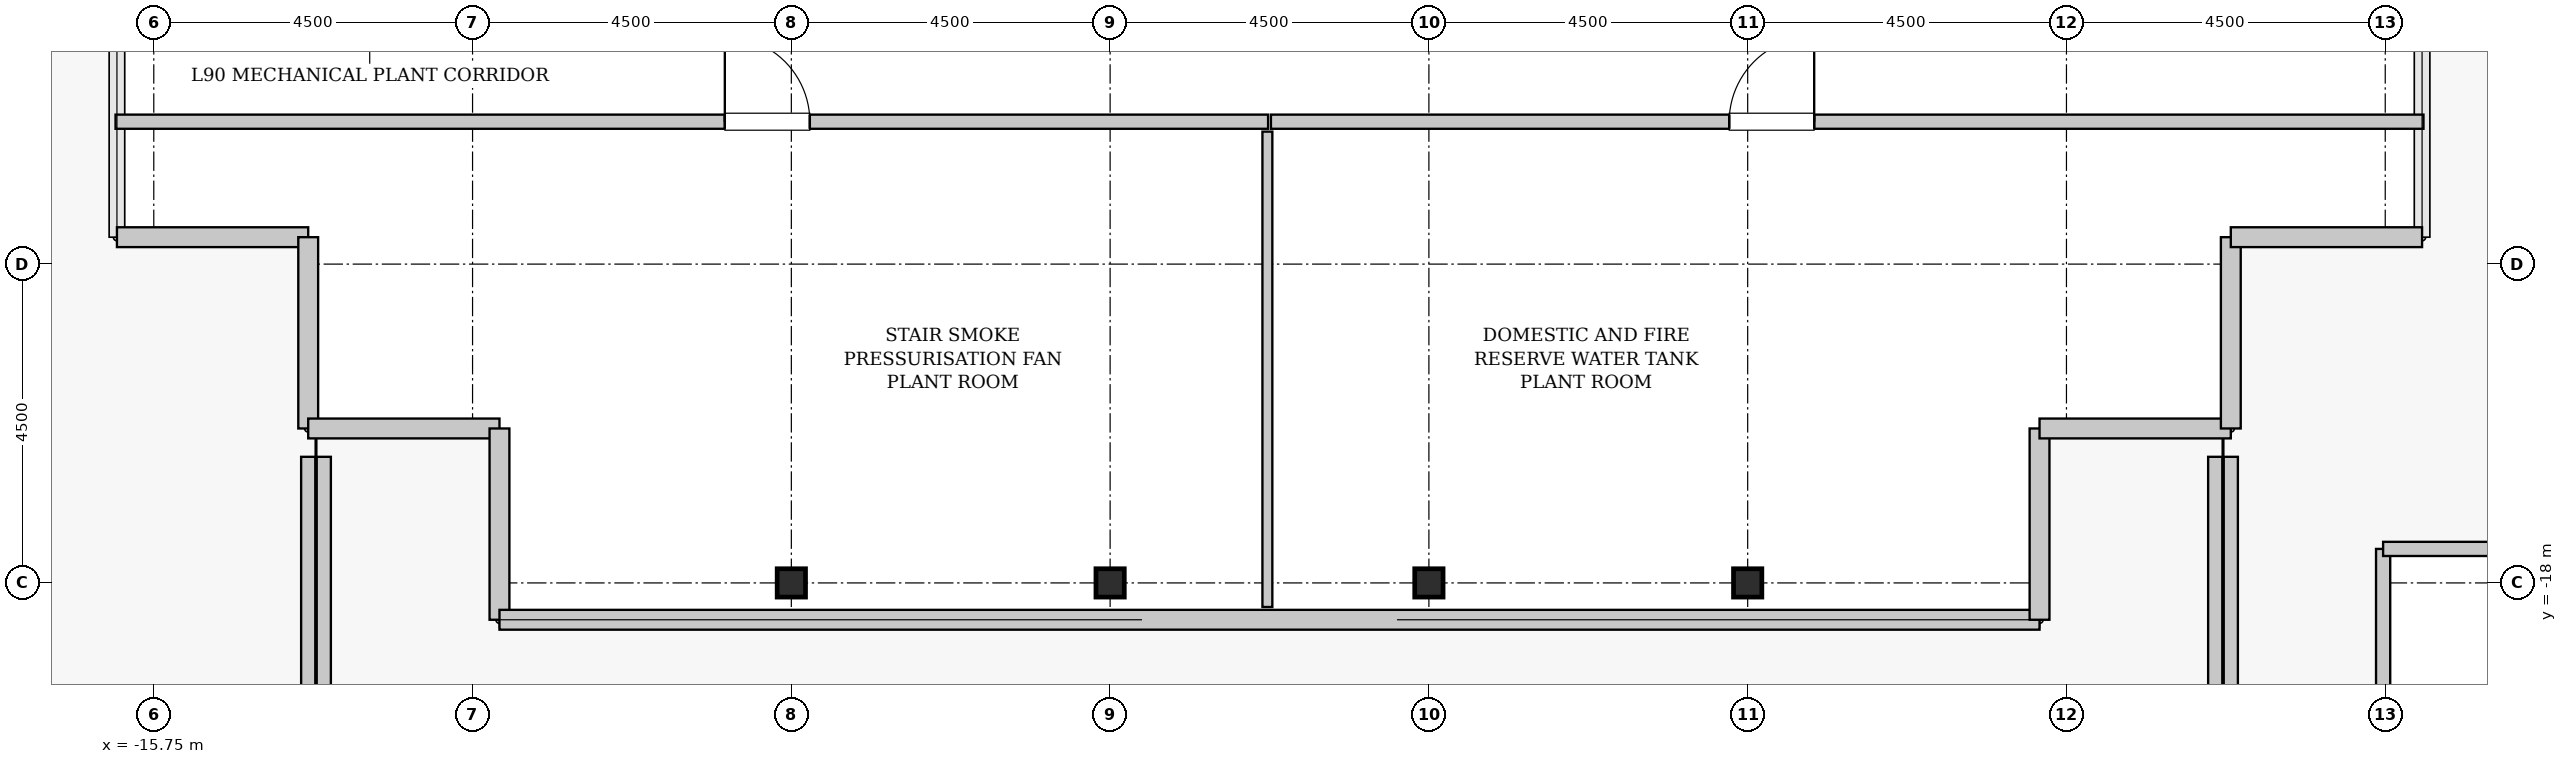
"""IFC4 building model, lengths in metres.
Left out: names, types, materials, properties, quantities, classifications, styles, units other than length and angle.
Written with IfcOpenShell. Run it as: python <this file> out.ifc"""

import sys

from ifc_helpers import new_model, si_unit, direction, frame, frame_2d, origin, origin_2d, place, context, subcontext, project, spatial, rectangle, hollow_rectangle, extrude, source, transform, mapped, element, fill, save


model = new_model("IFC4")
c1 = context("Model", 3, precision=1e-05, world=origin(), true_north=direction((0.0, 1.0)))
c2 = subcontext(c1, "Body", "Model", "MODEL_VIEW")
j1 = project(units=[si_unit("LENGTHUNIT", "METRE"), si_unit("PLANEANGLEUNIT", "RADIAN")], contexts=[c1])
p1 = place(None, origin())
s1 = spatial("IfcSite", under=j1, at=p1, CompositionType="ELEMENT")
p2 = place(p1, origin())
s2 = spatial("IfcBuilding", under=s1, at=p2, CompositionType="ELEMENT")
p3 = place(p2, frame((0.0, 0.0, 358.6)))
s3 = spatial("IfcBuildingStorey", under=s2, at=p3, CompositionType="ELEMENT", Elevation=358.6)
m1 = source(origin(), c2, "Body", "SweptSolid", [
    extrude(hollow_rectangle(XDim=0.4, YDim=0.4, WallThickness=0.02, InnerFilletRadius=0.02, OuterFilletRadius=0.04, at=origin_2d()), origin(), (0.0, 0.0, 1.0), 4.4),
])
for number, where, z_axis, x_axis in (
    (1, (-6.75, -18.0, 0.0), (0.0, 0.0, 1.0), (1.0, 0.0, 0.0)),
    (2, (-2.25, -18.0, 0.0), (0.0, 0.0, 1.0), (1.0, 0.0, 0.0)),
    (3, (2.25, -18.0, 0.0), (0.0, 0.0, 1.0), (1.0, 0.0, 0.0)),
    (4, (6.75, -18.0, 0.0), (0.0, 0.0, 1.0), (1.0, 0.0, 0.0)),
):
    element("IfcColumn", number, at=place(p3, frame(where, z_axis=z_axis, x_axis=x_axis)), inside=s3, PredefinedType="COLUMN", context=c2, shape_type="MappedRepresentation", body=[
        mapped(m1, transform((0.0, 0.0, 0.0), x_axis=(1.0, 0.0, 0.0), y_axis=(0.0, 1.0, 0.0), z_axis=(0.0, 0.0, 1.0), scale=1.0)),
    ])
m2 = source(origin(), c2, "Body", "SweptSolid", [
    extrude(rectangle(XDim=6.7, YDim=0.2, at=frame_2d((3.35, 0.0))), origin(), (0.0, 0.0, 1.0), 1.15),
])
p4 = place(p3, frame((-13.57, -16.22, 0.0), z_axis=(0.0, 0.0, 1.0), x_axis=(0.0, -1.0, 0.0)))
e5 = element("IfcWall", 5, at=p4, inside=s3, PredefinedType="PARAPET", context=c2, shape_type="MappedRepresentation", body=[
    mapped(m2, transform((0.0, 0.0, 0.0), x_axis=(1.0, 0.0, 0.0), y_axis=(0.0, 1.0, 0.0), z_axis=(0.0, 0.0, 1.0), scale=1.0)),
])
m3 = source(origin(), c2, "Body", "SweptSolid", [
    extrude(rectangle(XDim=2.7, YDim=0.2, at=frame_2d((1.35, 0.0))), origin(), (0.0, 0.0, 1.0), 1.15),
])
p5 = place(p3, frame((15.72, -17.52, 0.0), z_axis=(0.0, 0.0, 1.0), x_axis=(0.0, -1.0, 0.0)))
e6 = element("IfcWall", 6, at=p5, inside=s3, PredefinedType="PARAPET", context=c2, shape_type="MappedRepresentation", body=[
    mapped(m3, transform((0.0, 0.0, 0.0), x_axis=(1.0, 0.0, 0.0), y_axis=(0.0, 1.0, 0.0), z_axis=(0.0, 0.0, 1.0), scale=1.0)),
])
m4 = source(origin(), c2, "Body", "SweptSolid", [
    extrude(rectangle(XDim=4.0, YDim=0.2, at=frame_2d((2.0, 0.0))), origin(), (0.0, 0.0, 1.0), 1.15),
])
p6 = place(p3, frame((13.57, -20.22, 0.0), z_axis=(0.0, 0.0, 1.0), x_axis=(0.0, 1.0, 0.0)))
e7 = element("IfcWall", 7, at=p6, inside=s3, PredefinedType="PARAPET", context=c2, shape_type="MappedRepresentation", body=[
    mapped(m4, transform((0.0, 0.0, 0.0), x_axis=(1.0, 0.0, 0.0), y_axis=(0.0, 1.0, 0.0), z_axis=(0.0, 0.0, 1.0), scale=1.0)),
])
p7 = place(p3, frame((18.42, -17.52, 0.0), z_axis=(0.0, 0.0, 1.0), x_axis=(-1.0, 0.0, 0.0)))
e8 = element("IfcWall", 8, at=p7, inside=s3, PredefinedType="PARAPET", context=c2, shape_type="MappedRepresentation", body=[
    mapped(m3, transform((0.0, 0.0, 0.0), x_axis=(1.0, 0.0, 0.0), y_axis=(0.0, 1.0, 0.0), z_axis=(0.0, 0.0, 1.0), scale=1.0)),
])
p8 = place(p3, frame((-13.35, -22.92, 0.0), z_axis=(0.0, 0.0, 1.0), x_axis=(0.0, 1.0, 0.0)))
e9 = element("IfcWall", 9, at=p8, inside=s3, PredefinedType="PARAPET", context=c2, shape_type="MappedRepresentation", body=[
    mapped(m2, transform((0.0, 0.0, 0.0), x_axis=(1.0, 0.0, 0.0), y_axis=(0.0, 1.0, 0.0), z_axis=(0.0, 0.0, 1.0), scale=1.0)),
])
p9 = place(p3, frame((13.35, -16.22, 0.0), z_axis=(0.0, 0.0, 1.0), x_axis=(0.0, -1.0, 0.0)))
e10 = element("IfcWall", 10, at=p9, inside=s3, PredefinedType="PARAPET", context=c2, shape_type="MappedRepresentation", body=[
    mapped(m4, transform((0.0, 0.0, 0.0), x_axis=(1.0, 0.0, 0.0), y_axis=(0.0, 1.0, 0.0), z_axis=(0.0, 0.0, 1.0), scale=1.0)),
])
m5 = source(origin(), c2, "Body", "SweptSolid", [
    extrude(rectangle(XDim=2.7, YDim=0.28, at=frame_2d((1.35, 0.0))), origin(), (0.0, 0.0, 1.0), 4.1),
])
for number, where, z_axis, x_axis in (
    (11, (-16.27, -13.12, 0.0), (0.0, 0.0, 1.0), (1.0, 0.0, 0.0)),
    (12, (-13.57, -13.12, 0.0), (0.0, 0.0, 1.0), (0.0, -1.0, 0.0)),
    (13, (-13.57, -15.82, 0.0), (0.0, 0.0, 1.0), (1.0, 0.0, 0.0)),
    (14, (-10.87, -15.82, 0.0), (0.0, 0.0, 1.0), (0.0, -1.0, 0.0)),
):
    element("IfcWall", number, at=place(p3, frame(where, z_axis=z_axis, x_axis=x_axis)), inside=s3, PredefinedType="SOLIDWALL", context=c2, shape_type="MappedRepresentation", body=[
        mapped(m5, transform((0.0, 0.0, 0.0), x_axis=(1.0, 0.0, 0.0), y_axis=(0.0, 1.0, 0.0), z_axis=(0.0, 0.0, 1.0), scale=1.0)),
    ])
m6 = source(origin(), c2, "Body", "SweptSolid", [
    extrude(rectangle(XDim=21.74, YDim=0.28, at=frame_2d((10.87, 0.0))), origin(), (0.0, 0.0, 1.0), 1.1),
])
p10 = place(p3, frame((-10.87, -18.52, 0.0), z_axis=(0.0, 0.0, 1.0), x_axis=(1.0, 0.0, 0.0)))
e15 = element("IfcWall", 15, at=p10, inside=s3, PredefinedType="SOLIDWALL", context=c2, shape_type="MappedRepresentation", body=[
    mapped(m6, transform((0.0, 0.0, 0.0), x_axis=(1.0, 0.0, 0.0), y_axis=(0.0, 1.0, 0.0), z_axis=(0.0, 0.0, 1.0), scale=1.0)),
])
for number, where, z_axis, x_axis in (
    (16, (10.87, -18.52, 0.0), (0.0, 0.0, 1.0), (0.0, 1.0, 0.0)),
    (17, (10.87, -15.82, 0.0), (0.0, 0.0, 1.0), (1.0, 0.0, 0.0)),
    (18, (13.57, -15.82, 0.0), (0.0, 0.0, 1.0), (0.0, 1.0, 0.0)),
    (19, (13.57, -13.12, 0.0), (0.0, 0.0, 1.0), (1.0, 0.0, 0.0)),
):
    element("IfcWall", number, at=place(p3, frame(where, z_axis=z_axis, x_axis=x_axis)), inside=s3, PredefinedType="SOLIDWALL", context=c2, shape_type="MappedRepresentation", body=[
        mapped(m5, transform((0.0, 0.0, 0.0), x_axis=(1.0, 0.0, 0.0), y_axis=(0.0, 1.0, 0.0), z_axis=(0.0, 0.0, 1.0), scale=1.0)),
    ])
m7 = source(origin(), c2, "Body", "SweptSolid", [
    extrude(rectangle(XDim=16.27, YDim=0.2, at=frame_2d((8.135, 0.0))), origin(), (0.0, 0.0, 1.0), 4.085),
])
p11 = place(p3, frame((-16.29, -11.49, 0.0), z_axis=(0.0, 0.0, 1.0), x_axis=(1.0, 0.0, 0.0)))
e20 = element("IfcWall", 20, at=p11, inside=s3, PredefinedType="SOLIDWALL", context=c2, shape_type="MappedRepresentation", body=[
    mapped(m7, transform((0.0, 0.0, 0.0), x_axis=(1.0, 0.0, 0.0), y_axis=(0.0, 1.0, 0.0), z_axis=(0.0, 0.0, 1.0), scale=1.0)),
])
p12 = place(p11, frame((8.601, 0.0, 0.0)))
e21 = element("IfcOpeningElement", 21, at=p12, cuts=e20, PredefinedType="OPENING", context=c2, shape_type="SweptSolid", body=[
    extrude(rectangle(XDim=1.2, YDim=2.15, at=frame_2d((0.6, 1.075))), frame((0.0, 0.11, 0.0), z_axis=(0.0, -1.0, 0.0), x_axis=(1.0, 0.0, 0.0)), (0.0, 0.0, 1.0), 0.22),
])
m8 = source(origin(), c2, "Body", "SweptSolid", [
    extrude(rectangle(XDim=6.71, YDim=0.14, at=frame_2d((3.355, 0.0))), origin(), (0.0, 0.0, 1.0), 4.085),
])
p13 = place(p3, frame((-0.03, -18.34, 0.0), z_axis=(0.0, 0.0, 1.0), x_axis=(0.0, 1.0, 0.0)))
e22 = element("IfcWall", 22, at=p13, inside=s3, PredefinedType="PARTITIONING", context=c2, shape_type="MappedRepresentation", body=[
    mapped(m8, transform((0.0, 0.0, 0.0), x_axis=(1.0, 0.0, 0.0), y_axis=(0.0, 1.0, 0.0), z_axis=(0.0, 0.0, 1.0), scale=1.0)),
])
p14 = place(p3, frame((0.02, -11.49, 0.0), z_axis=(0.0, 0.0, 1.0), x_axis=(1.0, 0.0, 0.0)))
e23 = element("IfcWall", 23, at=p14, inside=s3, PredefinedType="SOLIDWALL", context=c2, shape_type="MappedRepresentation", body=[
    mapped(m7, transform((0.0, 0.0, 0.0), x_axis=(1.0, 0.0, 0.0), y_axis=(0.0, 1.0, 0.0), z_axis=(0.0, 0.0, 1.0), scale=1.0)),
])
p15 = place(p14, frame((6.469, 0.0, 0.0)))
e24 = element("IfcOpeningElement", 24, at=p15, cuts=e23, PredefinedType="OPENING", context=c2, shape_type="SweptSolid", body=[
    extrude(rectangle(XDim=1.2, YDim=2.15, at=frame_2d((0.6, 1.075))), frame((0.0, 0.11, 0.0), z_axis=(0.0, -1.0, 0.0), x_axis=(1.0, 0.0, 0.0)), (0.0, 0.0, 1.0), 0.22),
])
m9 = source(origin(), c2, "Body", "SweptSolid", [
    extrude(rectangle(XDim=1.2, YDim=2.15, at=frame_2d((0.6, 1.075))), frame((0.0, 0.025, 0.0), z_axis=(0.0, -1.0, 0.0), x_axis=(1.0, 0.0, 0.0)), (0.0, 0.0, 1.0), 0.05),
])
p16 = place(p12, origin())
e25 = element("IfcDoor", 25, at=p16, inside=s3, OperationType="SINGLE_SWING_LEFT", PredefinedType="DOOR", context=c2, shape_type="MappedRepresentation", body=[
    mapped(m9, transform((0.0, 0.0, 0.0), x_axis=(1.0, 0.0, 0.0), y_axis=(0.0, 1.0, 0.0), z_axis=(0.0, 0.0, 1.0), scale=1.0)),
])
fill(e21, e25)
p17 = place(p15, origin())
e26 = element("IfcDoor", 26, at=p17, inside=s3, OperationType="SINGLE_SWING_RIGHT", PredefinedType="DOOR", context=c2, shape_type="MappedRepresentation", body=[
    mapped(m9, transform((0.0, 0.0, 0.0), x_axis=(1.0, 0.0, 0.0), y_axis=(0.0, 1.0, 0.0), z_axis=(0.0, 0.0, 1.0), scale=1.0)),
])
fill(e24, e26)
save(model, sys.argv[1])
